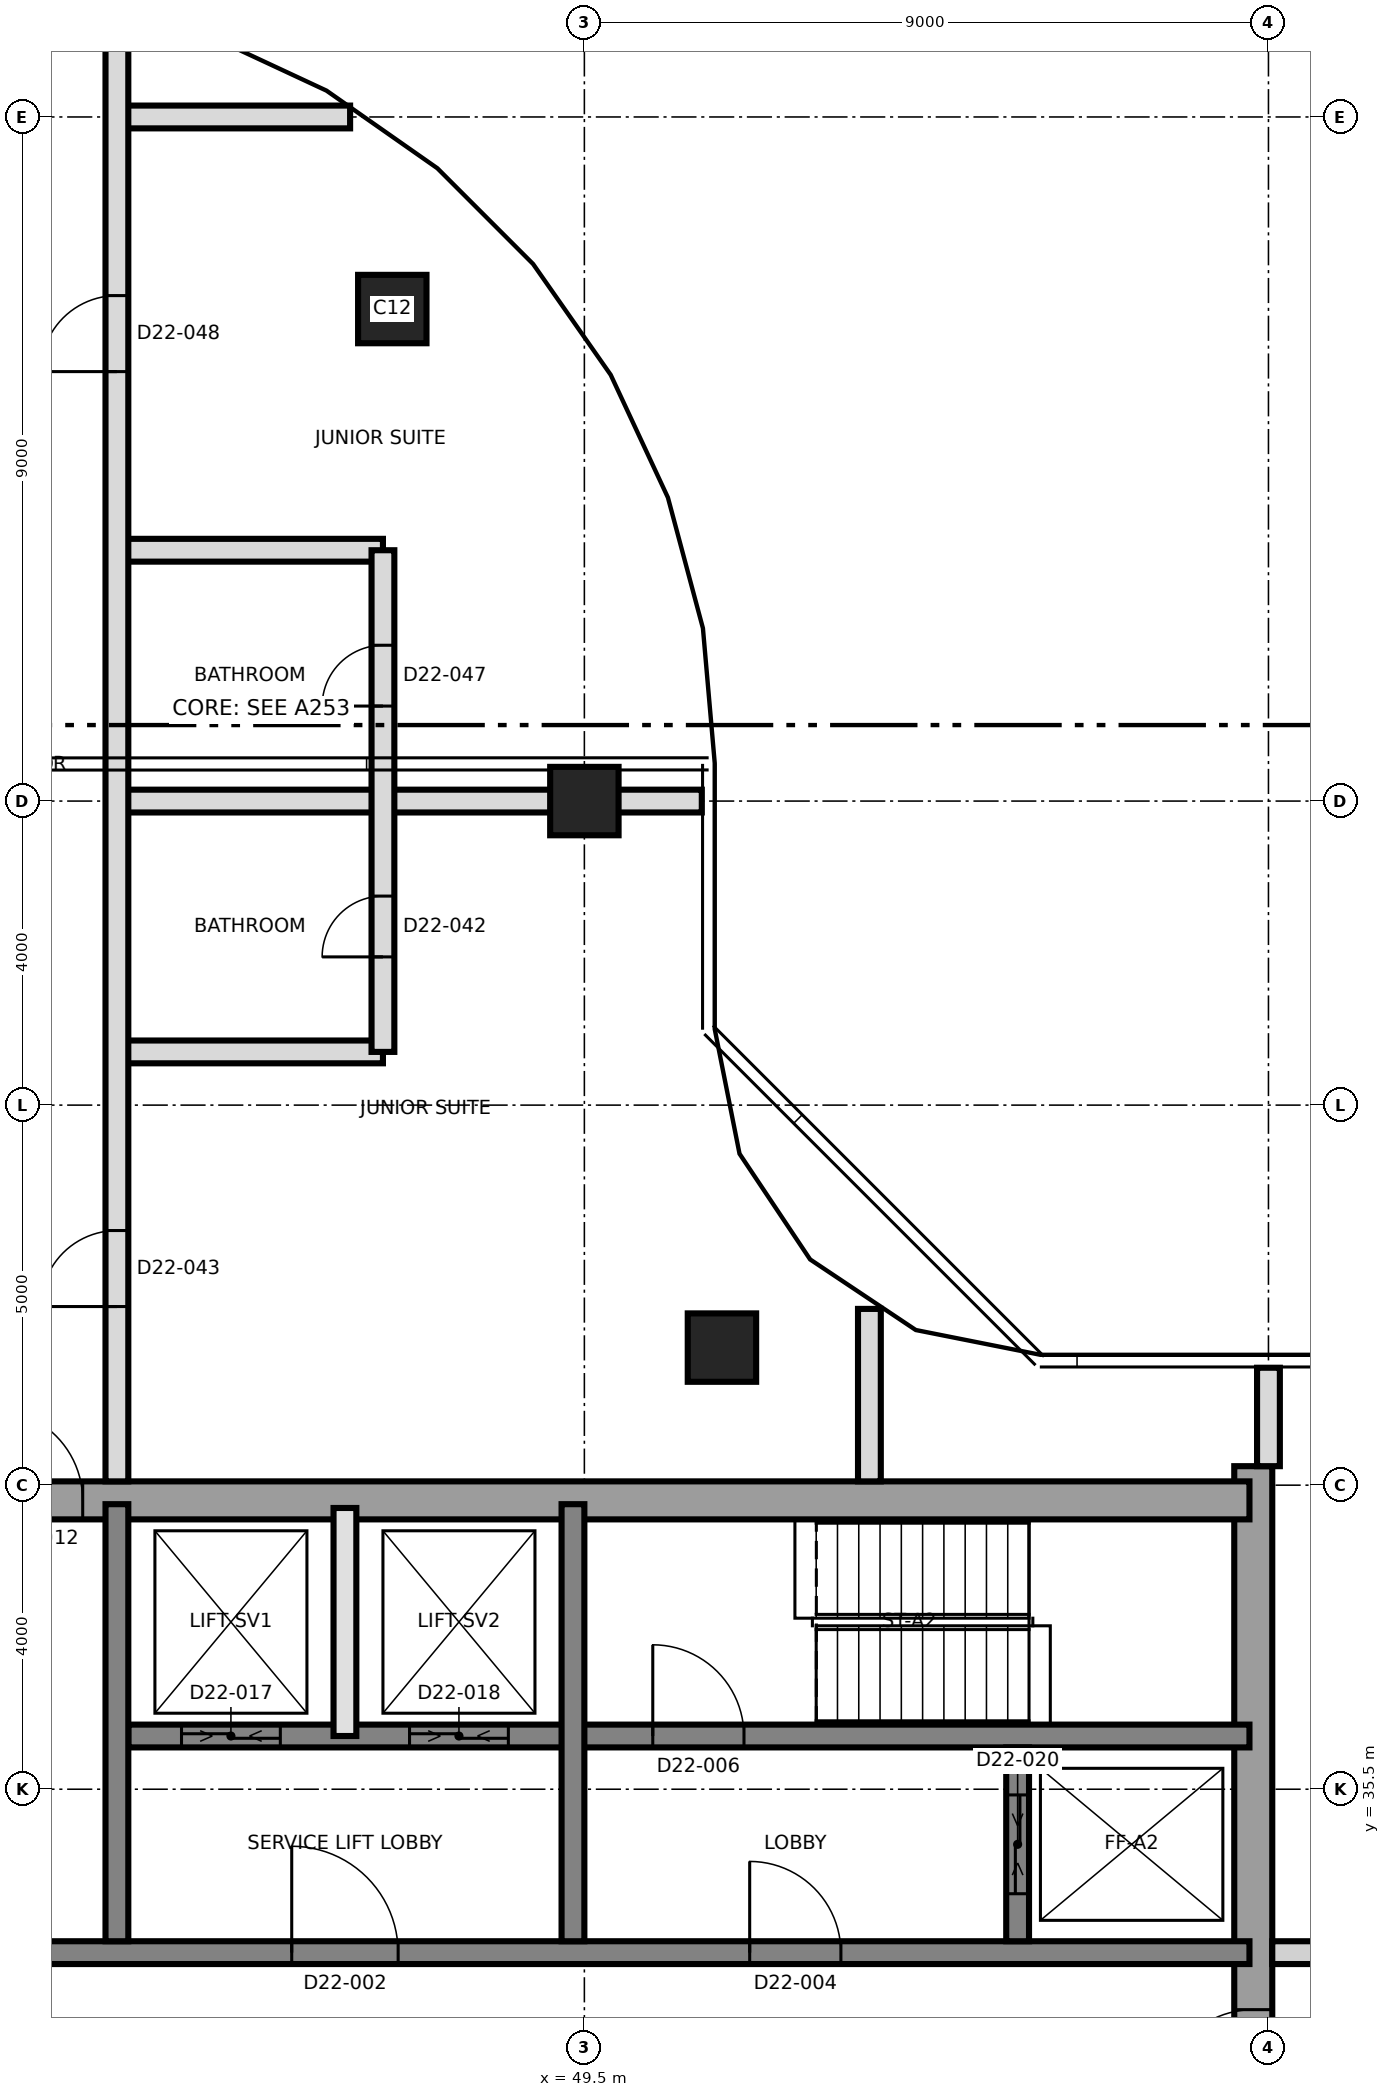
"""IFC4 building model, lengths in metres.
Left out: names, types, materials, properties, quantities, classifications, styles, units other than length and angle.
Written with IfcOpenShell. Run it as: python <this file> out.ifc"""

import sys

from ifc_helpers import new_model, si_unit, direction, frame, frame_2d, origin, origin_2d, place, context, subcontext, project, spatial, rectangle, extrude, element, fill, save


model = new_model("IFC4")
c1 = context("Model", 3, precision=1e-05, world=origin(), true_north=direction((0.0, 1.0)))
c2 = subcontext(c1, "Body", "Model", "MODEL_VIEW")
j1 = project(units=[si_unit("LENGTHUNIT", "METRE"), si_unit("PLANEANGLEUNIT", "RADIAN")], contexts=[c1])
p1 = place(None, origin())
s1 = spatial("IfcSite", under=j1, at=p1, CompositionType="ELEMENT")
p2 = place(p1, origin())
s2 = spatial("IfcBuilding", under=s1, at=p2, CompositionType="ELEMENT")
p3 = place(p2, frame((0.0, 0.0, 203.2)))
s3 = spatial("IfcBuildingStorey", under=s2, at=p3, CompositionType="ELEMENT", Elevation=203.2)
p4 = place(p3, frame((58.3, 21.25, 0.0), z_axis=(0.0, 0.0, 1.0), x_axis=(0.0, 1.0, 0.0)))
e1 = element("IfcWall", 1, at=p4, inside=s3, PredefinedType="SHEAR", context=c2, shape_type="SweptSolid", body=[
    extrude(rectangle(XDim=18.5, YDim=0.5, at=frame_2d((9.25, 0.0))), origin(), (0.0, 0.0, 1.0), 3.7),
])
p5 = place(p4, frame((10.15, 0.0, 0.0)))
e2 = element("IfcOpeningElement", 2, at=p5, cuts=e1, PredefinedType="OPENING", context=c2, shape_type="SweptSolid", body=[
    extrude(rectangle(XDim=1.2, YDim=2.1, at=frame_2d((0.6, 1.05))), frame((0.0, 0.26, 0.0), z_axis=(0.0, -1.0, 0.0), x_axis=(1.0, 0.0, 0.0)), (0.0, 0.0, 1.0), 0.52),
])
p6 = place(p3, frame((31.25, 39.3, 0.0), z_axis=(0.0, 0.0, 1.0), x_axis=(1.0, 0.0, 0.0)))
e3 = element("IfcWall", 3, at=p6, inside=s3, PredefinedType="SHEAR", context=c2, shape_type="SweptSolid", body=[
    extrude(rectangle(XDim=27.0, YDim=0.5, at=frame_2d((13.5, 0.0))), origin(), (0.0, 0.0, 1.0), 3.7),
])
p7 = place(p6, frame((10.45, 0.0, 0.0)))
e4 = element("IfcOpeningElement", 4, at=p7, cuts=e3, PredefinedType="OPENING", context=c2, shape_type="SweptSolid", body=[
    extrude(rectangle(XDim=1.2, YDim=2.1, at=frame_2d((0.6, 1.05))), frame((0.0, 0.26, 0.0), z_axis=(0.0, -1.0, 0.0), x_axis=(1.0, 0.0, 0.0)), (0.0, 0.0, 1.0), 0.52),
])
p8 = place(p3, frame((31.75, 33.35, 0.0), z_axis=(0.0, 0.0, 1.0), x_axis=(1.0, 0.0, 0.0)))
e5 = element("IfcWall", 5, at=p8, inside=s3, PredefinedType="SHEAR", context=c2, shape_type="SweptSolid", body=[
    extrude(rectangle(XDim=26.5, YDim=0.3, at=frame_2d((13.25, 0.0))), origin(), (0.0, 0.0, 1.0), 3.7),
])
p9 = place(p8, frame((13.9, 0.0, 0.0)))
e6 = element("IfcOpeningElement", 6, at=p9, cuts=e5, PredefinedType="OPENING", context=c2, shape_type="SweptSolid", body=[
    extrude(rectangle(XDim=1.4, YDim=2.1, at=frame_2d((0.7, 1.05))), frame((0.0, 0.16, 0.0), z_axis=(0.0, -1.0, 0.0), x_axis=(1.0, 0.0, 0.0)), (0.0, 0.0, 1.0), 0.32),
])
p10 = place(p8, frame((5.375, 0.0, 0.0)))
e7 = element("IfcOpeningElement", 7, at=p10, cuts=e5, PredefinedType="OPENING", context=c2, shape_type="SweptSolid", body=[
    extrude(rectangle(XDim=1.2, YDim=2.1, at=frame_2d((0.6, 1.05))), frame((0.0, 0.16, 0.0), z_axis=(0.0, -1.0, 0.0), x_axis=(1.0, 0.0, 0.0)), (0.0, 0.0, 1.0), 0.32),
])
p11 = place(p8, frame((19.925, 0.0, 0.0)))
e8 = element("IfcOpeningElement", 8, at=p11, cuts=e5, PredefinedType="OPENING", context=c2, shape_type="SweptSolid", body=[
    extrude(rectangle(XDim=1.2, YDim=2.1, at=frame_2d((0.6, 1.05))), frame((0.0, 0.16, 0.0), z_axis=(0.0, -1.0, 0.0), x_axis=(1.0, 0.0, 0.0)), (0.0, 0.0, 1.0), 0.32),
])
p12 = place(p3, frame((43.5, 36.2, 0.0), z_axis=(0.0, 0.0, 1.0), x_axis=(1.0, 0.0, 0.0)))
e9 = element("IfcWall", 9, at=p12, inside=s3, PredefinedType="SHEAR", context=c2, shape_type="SweptSolid", body=[
    extrude(rectangle(XDim=14.75, YDim=0.3, at=frame_2d((7.375, 0.0))), origin(), (0.0, 0.0, 1.0), 3.7),
])
p13 = place(p12, frame((6.9, 0.0, 0.0)))
e10 = element("IfcOpeningElement", 10, at=p13, cuts=e9, PredefinedType="OPENING", context=c2, shape_type="SweptSolid", body=[
    extrude(rectangle(XDim=1.2, YDim=2.1, at=frame_2d((0.6, 1.05))), frame((0.0, 0.16, 0.0), z_axis=(0.0, -1.0, 0.0), x_axis=(1.0, 0.0, 0.0)), (0.0, 0.0, 1.0), 0.32),
])
p14 = place(p12, frame((0.7, 0.0, 0.0)))
e11 = element("IfcOpeningElement", 11, at=p14, cuts=e9, PredefinedType="OPENING", context=c2, shape_type="SweptSolid", body=[
    extrude(rectangle(XDim=1.3, YDim=2.4, at=frame_2d((0.65, 1.2))), frame((0.0, 0.16, 0.0), z_axis=(0.0, -1.0, 0.0), x_axis=(1.0, 0.0, 0.0)), (0.0, 0.0, 1.0), 0.32),
])
p15 = place(p12, frame((3.7, 0.0, 0.0)))
e12 = element("IfcOpeningElement", 12, at=p15, cuts=e9, PredefinedType="OPENING", context=c2, shape_type="SweptSolid", body=[
    extrude(rectangle(XDim=1.3, YDim=2.4, at=frame_2d((0.65, 1.2))), frame((0.0, 0.16, 0.0), z_axis=(0.0, -1.0, 0.0), x_axis=(1.0, 0.0, 0.0)), (0.0, 0.0, 1.0), 0.32),
])
for number, where, z_axis, x_axis in (
    (13, (43.35, 33.5, 0.0), (0.0, 0.0, 1.0), (0.0, 1.0, 0.0)),
    (14, (49.35, 33.5, 0.0), (0.0, 0.0, 1.0), (0.0, 1.0, 0.0)),
):
    element("IfcWall", number, at=place(p3, frame(where, z_axis=z_axis, x_axis=x_axis)), inside=s3, PredefinedType="SHEAR", context=c2, shape_type="SweptSolid", body=[
        extrude(rectangle(XDim=5.75, YDim=0.3, at=frame_2d((2.875, 0.0))), origin(), (0.0, 0.0, 1.0), 3.7),
    ])
p16 = place(p3, frame((55.2, 33.5, 0.0), z_axis=(0.0, 0.0, 1.0), x_axis=(0.0, 1.0, 0.0)))
e15 = element("IfcWall", 15, at=p16, inside=s3, PredefinedType="SHEAR", context=c2, shape_type="SweptSolid", body=[
    extrude(rectangle(XDim=2.55, YDim=0.3, at=frame_2d((1.275, 0.0))), origin(), (0.0, 0.0, 1.0), 3.7),
])
p17 = place(p16, frame((0.625, 0.0, 0.0)))
e16 = element("IfcOpeningElement", 16, at=p17, cuts=e15, PredefinedType="OPENING", context=c2, shape_type="SweptSolid", body=[
    extrude(rectangle(XDim=1.3, YDim=2.4, at=frame_2d((0.65, 1.2))), frame((0.0, 0.16, 0.0), z_axis=(0.0, -1.0, 0.0), x_axis=(1.0, 0.0, 0.0)), (0.0, 0.0, 1.0), 0.32),
])
for number, where, z_axis, x_axis in (
    (17, (51.31, 41.31, 0.0), (0.0, 0.0, 1.0), (1.0, 0.0, 0.0)),
    (18, (49.5, 48.5, 0.0), (0.0, 0.0, 1.0), (1.0, 0.0, 0.0)),
    (19, (46.973, 54.973, 0.0), (0.0, 0.0, 1.0), (1.0, 0.0, 0.0)),
):
    element("IfcColumn", number, at=place(p3, frame(where, z_axis=z_axis, x_axis=x_axis)), inside=s3, PredefinedType="COLUMN", context=c2, shape_type="SweptSolid", body=[
        extrude(rectangle(XDim=0.9, YDim=0.9, at=origin_2d()), origin(), (0.0, 0.0, 1.0), 3.7),
    ])
p18 = place(p3, frame((46.35, 36.2, 0.0), z_axis=(0.0, 0.0, 1.0), x_axis=(0.0, 1.0, 0.0)))
e20 = element("IfcWall", 20, at=p18, inside=s3, PredefinedType="SOLIDWALL", context=c2, shape_type="SweptSolid", body=[
    extrude(rectangle(XDim=3.0, YDim=0.3, at=frame_2d((1.5, 0.0))), origin(), (0.0, 0.0, 1.0), 3.4),
])
p19 = place(p3, frame((58.55, 33.35, 0.0), z_axis=(0.0, 0.0, 1.0), x_axis=(1.0, 0.0, 0.0)))
e21 = element("IfcWall", 21, at=p19, inside=s3, PredefinedType="PARTITIONING", context=c2, shape_type="SweptSolid", body=[
    extrude(rectangle(XDim=26.78, YDim=0.3, at=frame_2d((13.39, 0.0))), origin(), (0.0, 0.0, 1.0), 3.4),
])
p20 = place(p19, frame((1.1, 0.0, 0.0)))
e22 = element("IfcOpeningElement", 22, at=p20, cuts=e21, PredefinedType="OPENING", context=c2, shape_type="SweptSolid", body=[
    extrude(rectangle(XDim=1.0, YDim=2.1, at=frame_2d((0.5, 1.05))), frame((0.0, 0.16, 0.0), z_axis=(0.0, -1.0, 0.0), x_axis=(1.0, 0.0, 0.0)), (0.0, 0.0, 1.0), 0.32),
])
p21 = place(p19, frame((6.95, 0.0, 0.0)))
e23 = element("IfcOpeningElement", 23, at=p21, cuts=e21, PredefinedType="OPENING", context=c2, shape_type="SweptSolid", body=[
    extrude(rectangle(XDim=1.0, YDim=2.1, at=frame_2d((0.5, 1.05))), frame((0.0, 0.16, 0.0), z_axis=(0.0, -1.0, 0.0), x_axis=(1.0, 0.0, 0.0)), (0.0, 0.0, 1.0), 0.32),
])
p22 = place(p19, frame((14.6, 0.0, 0.0)))
e24 = element("IfcOpeningElement", 24, at=p22, cuts=e21, PredefinedType="OPENING", context=c2, shape_type="SweptSolid", body=[
    extrude(rectangle(XDim=1.0, YDim=2.4, at=frame_2d((0.5, 1.2))), frame((0.0, 0.16, 0.0), z_axis=(0.0, -1.0, 0.0), x_axis=(1.0, 0.0, 0.0)), (0.0, 0.0, 1.0), 0.32),
])
p23 = place(p19, frame((20.3, 0.0, 0.0)))
e25 = element("IfcOpeningElement", 25, at=p23, cuts=e21, PredefinedType="OPENING", context=c2, shape_type="SweptSolid", body=[
    extrude(rectangle(XDim=1.0, YDim=2.4, at=frame_2d((0.5, 1.2))), frame((0.0, 0.16, 0.0), z_axis=(0.0, -1.0, 0.0), x_axis=(1.0, 0.0, 0.0)), (0.0, 0.0, 1.0), 0.32),
])
p24 = place(p3, frame((43.35, 45.2, 0.0), z_axis=(0.0, 0.0, 1.0), x_axis=(1.0, 0.0, 0.0)))
e26 = element("IfcWall", 26, at=p24, inside=s3, PredefinedType="PARTITIONING", context=c2, shape_type="SweptSolid", body=[
    extrude(rectangle(XDim=3.5, YDim=0.3, at=frame_2d((1.75, 0.0))), origin(), (0.0, 0.0, 1.0), 3.4),
])
p25 = place(p3, frame((43.35, 48.5, 0.0), z_axis=(0.0, 0.0, 1.0), x_axis=(1.0, 0.0, 0.0)))
e27 = element("IfcWall", 27, at=p25, inside=s3, PredefinedType="PARTITIONING", context=c2, shape_type="SweptSolid", body=[
    extrude(rectangle(XDim=7.695, YDim=0.3, at=frame_2d((3.847, 0.0))), origin(), (0.0, 0.0, 1.0), 3.35),
])
p26 = place(p3, frame((43.35, 51.8, 0.0), z_axis=(0.0, 0.0, 1.0), x_axis=(1.0, 0.0, 0.0)))
e28 = element("IfcWall", 28, at=p26, inside=s3, PredefinedType="PARTITIONING", context=c2, shape_type="SweptSolid", body=[
    extrude(rectangle(XDim=3.5, YDim=0.3, at=frame_2d((1.75, 0.0))), origin(), (0.0, 0.0, 1.0), 3.4),
])
p27 = place(p3, frame((43.35, 57.5, 0.0), z_axis=(0.0, 0.0, 1.0), x_axis=(1.0, 0.0, 0.0)))
e29 = element("IfcWall", 29, at=p27, inside=s3, PredefinedType="PARTITIONING", context=c2, shape_type="SweptSolid", body=[
    extrude(rectangle(XDim=3.068, YDim=0.3, at=frame_2d((1.534, 0.0))), origin(), (0.0, 0.0, 1.0), 3.35),
])
p28 = place(p3, frame((43.35, 39.55, 0.0), z_axis=(0.0, 0.0, 1.0), x_axis=(0.0, 1.0, 0.0)))
e30 = element("IfcWall", 30, at=p28, inside=s3, PredefinedType="PARTITIONING", context=c2, shape_type="SweptSolid", body=[
    extrude(rectangle(XDim=18.993, YDim=0.3, at=frame_2d((9.497, 0.0))), origin(), (0.0, 0.0, 1.0), 3.35),
])
p29 = place(p28, frame((2.3, 0.0, 0.0)))
e31 = element("IfcOpeningElement", 31, at=p29, cuts=e30, PredefinedType="OPENING", context=c2, shape_type="SweptSolid", body=[
    extrude(rectangle(XDim=1.0, YDim=2.4, at=frame_2d((0.5, 1.2))), frame((0.0, 0.16, 0.0), z_axis=(0.0, -1.0, 0.0), x_axis=(1.0, 0.0, 0.0)), (0.0, 0.0, 1.0), 0.32),
])
p30 = place(p28, frame((14.6, 0.0, 0.0)))
e32 = element("IfcOpeningElement", 32, at=p30, cuts=e30, PredefinedType="OPENING", context=c2, shape_type="SweptSolid", body=[
    extrude(rectangle(XDim=1.0, YDim=2.4, at=frame_2d((0.5, 1.2))), frame((0.0, 0.16, 0.0), z_axis=(0.0, -1.0, 0.0), x_axis=(1.0, 0.0, 0.0)), (0.0, 0.0, 1.0), 0.32),
])
p31 = place(p3, frame((46.85, 45.2, 0.0), z_axis=(0.0, 0.0, 1.0), x_axis=(0.0, 1.0, 0.0)))
e33 = element("IfcWall", 33, at=p31, inside=s3, PredefinedType="PARTITIONING", context=c2, shape_type="SweptSolid", body=[
    extrude(rectangle(XDim=6.6, YDim=0.3, at=frame_2d((3.3, 0.0))), origin(), (0.0, 0.0, 1.0), 3.4),
])
p32 = place(p31, frame((1.25, 0.0, 0.0)))
e34 = element("IfcOpeningElement", 34, at=p32, cuts=e33, PredefinedType="OPENING", context=c2, shape_type="SweptSolid", body=[
    extrude(rectangle(XDim=0.8, YDim=2.1, at=frame_2d((0.4, 1.05))), frame((0.0, 0.16, 0.0), z_axis=(0.0, -1.0, 0.0), x_axis=(1.0, 0.0, 0.0)), (0.0, 0.0, 1.0), 0.32),
])
p33 = place(p31, frame((4.55, 0.0, 0.0)))
e35 = element("IfcOpeningElement", 35, at=p33, cuts=e33, PredefinedType="OPENING", context=c2, shape_type="SweptSolid", body=[
    extrude(rectangle(XDim=0.8, YDim=2.1, at=frame_2d((0.4, 1.05))), frame((0.0, 0.16, 0.0), z_axis=(0.0, -1.0, 0.0), x_axis=(1.0, 0.0, 0.0)), (0.0, 0.0, 1.0), 0.32),
])
p34 = place(p3, frame((53.25, 39.55, 0.0), z_axis=(0.0, 0.0, 1.0), x_axis=(0.0, 1.0, 0.0)))
e36 = element("IfcWall", 36, at=p34, inside=s3, PredefinedType="PARTITIONING", context=c2, shape_type="SweptSolid", body=[
    extrude(rectangle(XDim=2.269, YDim=0.3, at=frame_2d((1.135, 0.0))), origin(), (0.0, 0.0, 1.0), 3.35),
])
p35 = place(p3, frame((58.5, 39.75, 0.0), z_axis=(0.0, 0.0, 1.0), x_axis=(0.0, 1.0, 0.0)))
e37 = element("IfcWall", 37, at=p35, inside=s3, PredefinedType="PARTITIONING", context=c2, shape_type="SweptSolid", body=[
    extrude(rectangle(XDim=1.295, YDim=0.3, at=frame_2d((0.647, 0.0))), origin(), (0.0, 0.0, 1.0), 3.35),
])
p36 = place(p9, origin())
e38 = element("IfcDoor", 38, at=p36, inside=s3, OperationType="SINGLE_SWING_RIGHT", PredefinedType="DOOR", context=c2, shape_type="SweptSolid", body=[
    extrude(rectangle(XDim=1.4, YDim=2.1, at=frame_2d((0.7, 1.05))), frame((0.0, 0.025, 0.0), z_axis=(0.0, -1.0, 0.0), x_axis=(1.0, 0.0, 0.0)), (0.0, 0.0, 1.0), 0.05),
])
fill(e6, e38)
p37 = place(p11, origin())
e39 = element("IfcDoor", 39, at=p37, inside=s3, OperationType="SINGLE_SWING_RIGHT", PredefinedType="DOOR", context=c2, shape_type="SweptSolid", body=[
    extrude(rectangle(XDim=1.2, YDim=2.1, at=frame_2d((0.6, 1.05))), frame((0.0, 0.025, 0.0), z_axis=(0.0, -1.0, 0.0), x_axis=(1.0, 0.0, 0.0)), (0.0, 0.0, 1.0), 0.05),
])
fill(e8, e39)
p38 = place(p13, origin())
e40 = element("IfcDoor", 40, at=p38, inside=s3, OperationType="SINGLE_SWING_LEFT", PredefinedType="DOOR", context=c2, shape_type="SweptSolid", body=[
    extrude(rectangle(XDim=1.2, YDim=2.1, at=frame_2d((0.6, 1.05))), frame((0.0, 0.025, 0.0), z_axis=(0.0, -1.0, 0.0), x_axis=(1.0, 0.0, 0.0)), (0.0, 0.0, 1.0), 0.05),
])
fill(e10, e40)
p39 = place(p5, origin())
e41 = element("IfcDoor", 41, at=p39, inside=s3, OperationType="SINGLE_SWING_LEFT", PredefinedType="DOOR", context=c2, shape_type="SweptSolid", body=[
    extrude(rectangle(XDim=1.2, YDim=2.1, at=frame_2d((0.6, 1.05))), frame((0.0, 0.025, 0.0), z_axis=(0.0, -1.0, 0.0), x_axis=(1.0, 0.0, 0.0)), (0.0, 0.0, 1.0), 0.05),
])
fill(e2, e41)
p40 = place(p7, origin())
e42 = element("IfcDoor", 42, at=p40, inside=s3, OperationType="SINGLE_SWING_RIGHT", PredefinedType="DOOR", context=c2, shape_type="SweptSolid", body=[
    extrude(rectangle(XDim=1.2, YDim=2.1, at=frame_2d((0.6, 1.05))), frame((0.0, 0.025, 0.0), z_axis=(0.0, -1.0, 0.0), x_axis=(1.0, 0.0, 0.0)), (0.0, 0.0, 1.0), 0.05),
])
fill(e4, e42)
p41 = place(p14, origin())
e43 = element("IfcDoor", 43, at=p41, inside=s3, OperationType="SLIDING_TO_LEFT", PredefinedType="DOOR", context=c2, shape_type="SweptSolid", body=[
    extrude(rectangle(XDim=1.3, YDim=2.4, at=frame_2d((0.65, 1.2))), frame((0.0, 0.025, 0.0), z_axis=(0.0, -1.0, 0.0), x_axis=(1.0, 0.0, 0.0)), (0.0, 0.0, 1.0), 0.05),
])
fill(e11, e43)
p42 = place(p15, origin())
e44 = element("IfcDoor", 44, at=p42, inside=s3, OperationType="SLIDING_TO_LEFT", PredefinedType="DOOR", context=c2, shape_type="SweptSolid", body=[
    extrude(rectangle(XDim=1.3, YDim=2.4, at=frame_2d((0.65, 1.2))), frame((0.0, 0.025, 0.0), z_axis=(0.0, -1.0, 0.0), x_axis=(1.0, 0.0, 0.0)), (0.0, 0.0, 1.0), 0.05),
])
fill(e12, e44)
p43 = place(p17, origin())
e45 = element("IfcDoor", 45, at=p43, inside=s3, OperationType="SLIDING_TO_LEFT", PredefinedType="DOOR", context=c2, shape_type="SweptSolid", body=[
    extrude(rectangle(XDim=1.3, YDim=2.4, at=frame_2d((0.65, 1.2))), frame((0.0, 0.025, 0.0), z_axis=(0.0, -1.0, 0.0), x_axis=(1.0, 0.0, 0.0)), (0.0, 0.0, 1.0), 0.05),
])
fill(e16, e45)
p44 = place(p32, origin())
e46 = element("IfcDoor", 46, at=p44, inside=s3, OperationType="SINGLE_SWING_RIGHT", PredefinedType="DOOR", context=c2, shape_type="SweptSolid", body=[
    extrude(rectangle(XDim=0.8, YDim=2.1, at=frame_2d((0.4, 1.05))), frame((0.0, 0.025, 0.0), z_axis=(0.0, -1.0, 0.0), x_axis=(1.0, 0.0, 0.0)), (0.0, 0.0, 1.0), 0.05),
])
fill(e34, e46)
p45 = place(p29, origin())
e47 = element("IfcDoor", 47, at=p45, inside=s3, OperationType="SINGLE_SWING_LEFT", PredefinedType="DOOR", context=c2, shape_type="SweptSolid", body=[
    extrude(rectangle(XDim=1.0, YDim=2.4, at=frame_2d((0.5, 1.2))), frame((0.0, 0.025, 0.0), z_axis=(0.0, -1.0, 0.0), x_axis=(1.0, 0.0, 0.0)), (0.0, 0.0, 1.0), 0.05),
])
fill(e31, e47)
p46 = place(p33, origin())
e48 = element("IfcDoor", 48, at=p46, inside=s3, OperationType="SINGLE_SWING_LEFT", PredefinedType="DOOR", context=c2, shape_type="SweptSolid", body=[
    extrude(rectangle(XDim=0.8, YDim=2.1, at=frame_2d((0.4, 1.05))), frame((0.0, 0.025, 0.0), z_axis=(0.0, -1.0, 0.0), x_axis=(1.0, 0.0, 0.0)), (0.0, 0.0, 1.0), 0.05),
])
fill(e35, e48)
p47 = place(p30, origin())
e49 = element("IfcDoor", 49, at=p47, inside=s3, OperationType="SINGLE_SWING_LEFT", PredefinedType="DOOR", context=c2, shape_type="SweptSolid", body=[
    extrude(rectangle(XDim=1.0, YDim=2.4, at=frame_2d((0.5, 1.2))), frame((0.0, 0.025, 0.0), z_axis=(0.0, -1.0, 0.0), x_axis=(1.0, 0.0, 0.0)), (0.0, 0.0, 1.0), 0.05),
])
fill(e32, e49)
save(model, sys.argv[1])
